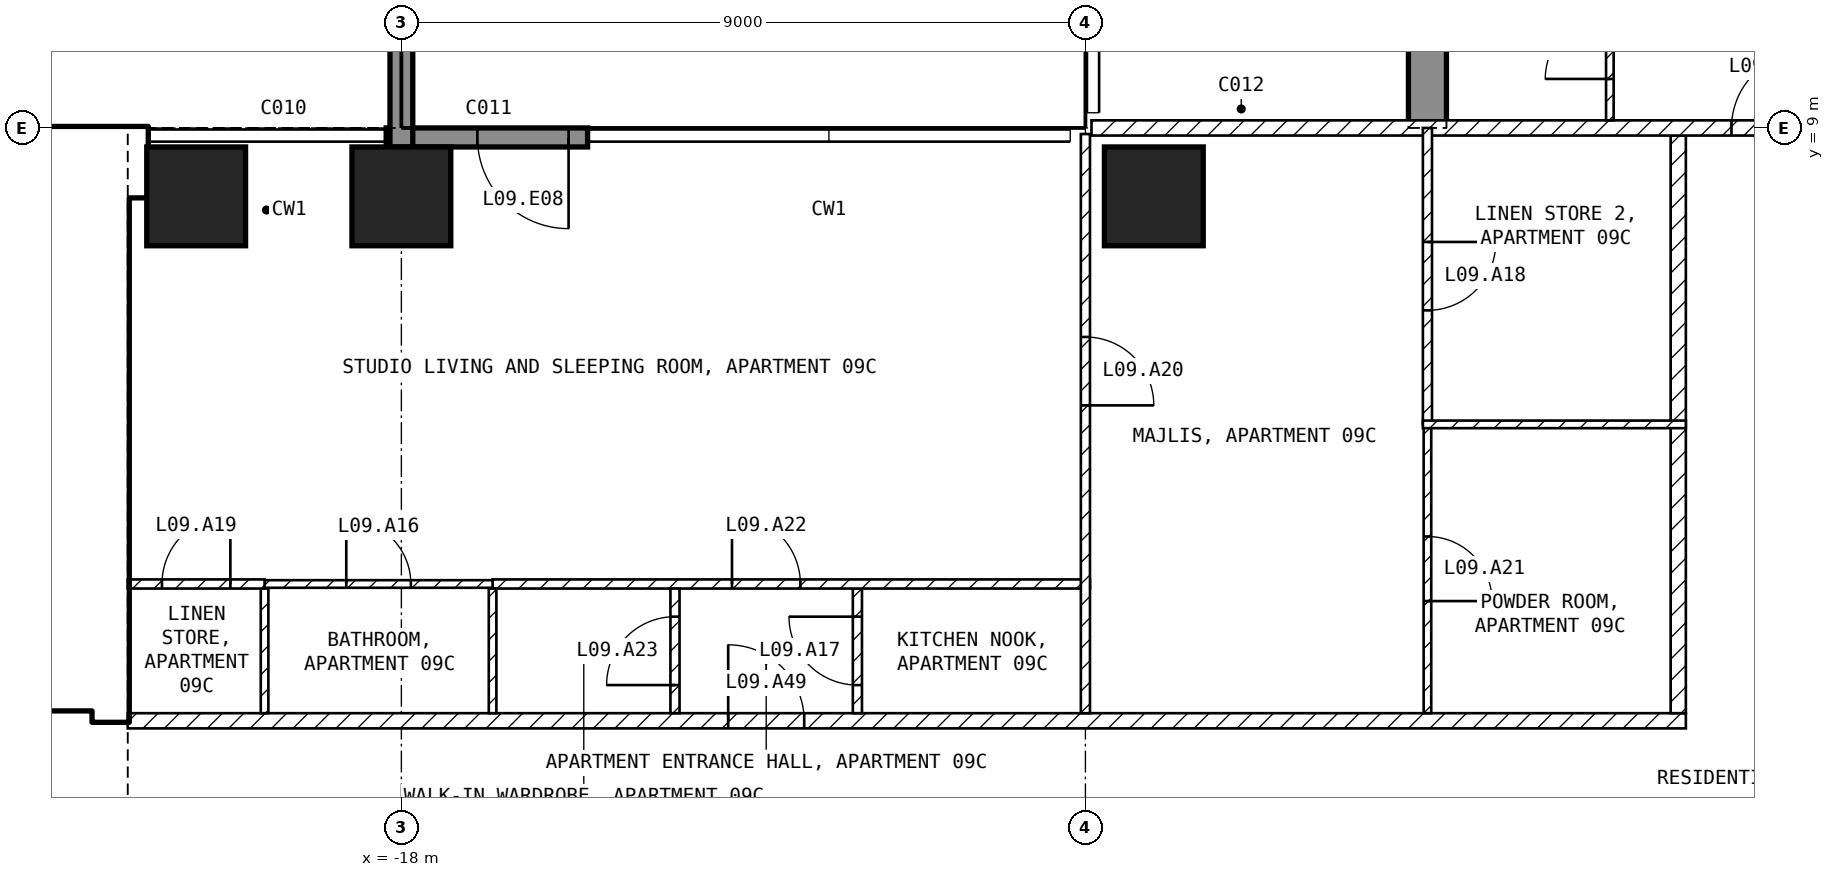
"""IFC4 building model, lengths in metres.
Left out: names, types, materials, properties, quantities, classifications, styles, units other than length and angle.
Written with IfcOpenShell. Run it as: python <this file> out.ifc"""

import sys

from ifc_helpers import new_model, si_unit, direction, frame, frame_2d, origin, origin_2d, place, context, subcontext, project, spatial, polyline, rectangle, outline, extrude, element, fill, save


model = new_model("IFC4")
c1 = context("Model", 3, precision=1e-05, world=origin(), true_north=direction((0.0, 1.0)))
c2 = subcontext(c1, "Body", "Model", "MODEL_VIEW")
j1 = project(units=[si_unit("LENGTHUNIT", "METRE"), si_unit("PLANEANGLEUNIT", "RADIAN")], contexts=[c1])
p1 = place(None, origin())
s1 = spatial("IfcSite", under=j1, at=p1, CompositionType="ELEMENT")
p2 = place(p1, origin())
s2 = spatial("IfcBuilding", under=s1, at=p2, CompositionType="ELEMENT")
p3 = place(p2, frame((0.0, 0.0, 50.5)))
s3 = spatial("IfcBuildingStorey", under=s2, at=p3, CompositionType="ELEMENT", Elevation=50.5)
for number, where, z_axis, x_axis in (
    (1, (-20.7, 8.1, -0.25), (0.0, 0.0, 1.0), (1.0, 0.0, 0.0)),
    (2, (-18.0, 8.1, -0.25), (0.0, 0.0, 1.0), (1.0, 0.0, 0.0)),
    (3, (-8.1, 8.1, -0.25), (0.0, 0.0, 1.0), (1.0, 0.0, 0.0)),
):
    element("IfcColumn", number, at=place(p3, frame(where, z_axis=z_axis, x_axis=x_axis)), inside=s3, PredefinedType="COLUMN", context=c2, shape_type="SweptSolid", body=[
        extrude(rectangle(XDim=1.3, YDim=1.3, at=origin_2d()), origin(), (0.0, 0.0, 1.0), 3.5),
    ])
p4 = place(p3, frame((-4.75, 9.0, -0.25), z_axis=(1.0, 0.0, 0.0), x_axis=(0.0, 1.0, 0.0)))
e4 = element("IfcWall", 4, at=p4, inside=s3, PredefinedType="SHEAR", context=c2, shape_type="SweptSolid", body=[
    extrude(outline(polyline([(0.0, 0.0), (2.1, 0.0), (2.1, 2.65), (4.5, 2.65), (4.5, 0.0), (9.9, 0.0), (9.9, 2.65), (12.3, 2.65), (12.3, 0.0), (16.45, 0.0), (16.45, 3.5), (0.0, 3.5), (0.0, 0.0)])), origin(), (0.0, 0.0, 1.0), 0.5),
])
p5 = place(p3, frame((-15.55, 8.875, 0.0), z_axis=(0.0, 0.0, 1.0), x_axis=(-1.0, 0.0, 0.0)))
e5 = element("IfcWall", 5, at=p5, inside=s3, PredefinedType="SOLIDWALL", context=c2, shape_type="SweptSolid", body=[
    extrude(rectangle(XDim=2.65, YDim=0.25, at=frame_2d((1.325, 0.0))), origin(), (0.0, 0.0, 1.0), 3.25),
])
p6 = place(p5, frame((0.25, 0.0, 0.0)))
e6 = element("IfcOpeningElement", 6, at=p6, cuts=e5, PredefinedType="OPENING", context=c2, shape_type="SweptSolid", body=[
    extrude(rectangle(XDim=1.2, YDim=2.4, at=frame_2d((0.6, 1.2))), frame((0.0, 0.135, 0.0), z_axis=(0.0, -1.0, 0.0), x_axis=(1.0, 0.0, 0.0)), (0.0, 0.0, 1.0), 0.27),
])
p7 = place(p3, frame((-18.0, 8.75, 0.0), z_axis=(0.0, 0.0, 1.0), x_axis=(0.0, 1.0, 0.0)))
e7 = element("IfcWall", 7, at=p7, inside=s3, PredefinedType="SOLIDWALL", context=c2, shape_type="SweptSolid", body=[
    extrude(rectangle(XDim=2.95, YDim=0.3, at=frame_2d((1.475, 0.0))), origin(), (0.0, 0.0, 1.0), 3.25),
])
p8 = place(p3, frame((-31.5, 8.55, 0.0), z_axis=(0.0, 0.0, 1.0), x_axis=(1.0, 0.0, 0.0)))
e8 = element("IfcWall", 8, at=p8, inside=s3, PredefinedType="SHEAR", context=c2, shape_type="SweptSolid", body=[
    extrude(rectangle(XDim=10.15, YDim=0.9, at=frame_2d((5.075, 0.0))), origin(), (0.0, 0.0, 1.0), 3.25),
])
p9 = place(p3, frame((-21.825, 1.2, 0.0), z_axis=(0.0, 0.0, 1.0), x_axis=(0.0, 1.0, 0.0)))
e9 = element("IfcWall", 9, at=p9, inside=s3, PredefinedType="SHEAR", context=c2, shape_type="SweptSolid", body=[
    extrude(rectangle(XDim=6.9, YDim=0.45, at=frame_2d((3.45, 0.0))), origin(), (0.0, 0.0, 1.0), 3.25),
])
p10 = place(p3, frame((-35.1, 1.45, 0.0), z_axis=(0.0, 0.0, 1.0), x_axis=(1.0, 0.0, 0.0)))
e10 = element("IfcWall", 10, at=p10, inside=s3, PredefinedType="SOLIDWALL", context=c2, shape_type="SweptSolid", body=[
    extrude(rectangle(XDim=13.05, YDim=0.2, at=frame_2d((6.525, 0.0))), origin(), (0.0, 0.0, 1.0), 3.25),
])
p11 = place(p10, frame((11.3, 0.0, 0.0)))
e11 = element("IfcOpeningElement", 11, at=p11, cuts=e10, PredefinedType="OPENING", context=c2, shape_type="SweptSolid", body=[
    extrude(rectangle(XDim=1.0, YDim=2.1, at=frame_2d((0.5, 1.05))), frame((0.0, 0.11, 0.0), z_axis=(0.0, -1.0, 0.0), x_axis=(1.0, 0.0, 0.0)), (0.0, 0.0, 1.0), 0.22),
])
p12 = place(p10, frame((8.8, 0.0, 0.0)))
e12 = element("IfcOpeningElement", 12, at=p12, cuts=e10, PredefinedType="OPENING", context=c2, shape_type="SweptSolid", body=[
    extrude(rectangle(XDim=1.0, YDim=2.1, at=frame_2d((0.5, 1.05))), frame((0.0, 0.11, 0.0), z_axis=(0.0, -1.0, 0.0), x_axis=(1.0, 0.0, 0.0)), (0.0, 0.0, 1.0), 0.22),
])
p13 = place(p3, frame((-28.35, 5.15, 0.0), z_axis=(0.0, 0.0, 1.0), x_axis=(1.0, 0.0, 0.0)))
e13 = element("IfcWall", 13, at=p13, inside=s3, PredefinedType="SOLIDWALL", context=c2, shape_type="SweptSolid", body=[
    extrude(rectangle(XDim=6.3, YDim=0.2, at=frame_2d((3.15, 0.0))), origin(), (0.0, 0.0, 1.0), 3.25),
])
p14 = place(p13, frame((5.1, 0.0, 0.0)))
e14 = element("IfcOpeningElement", 14, at=p14, cuts=e13, PredefinedType="OPENING", context=c2, shape_type="SweptSolid", body=[
    extrude(rectangle(XDim=1.0, YDim=2.1, at=frame_2d((0.5, 1.05))), frame((0.0, 0.11, 0.0), z_axis=(0.0, -1.0, 0.0), x_axis=(1.0, 0.0, 0.0)), (0.0, 0.0, 1.0), 0.22),
])
p15 = place(p3, frame((-21.6, 1.2, 0.0), z_axis=(0.0, 0.0, 1.0), x_axis=(1.0, 0.0, 0.0)))
e15 = element("IfcWall", 15, at=p15, inside=s3, PredefinedType="PARTITIONING", context=c2, shape_type="SweptSolid", body=[
    extrude(rectangle(XDim=20.5, YDim=0.2, at=frame_2d((10.25, 0.0))), origin(), (0.0, 0.0, 1.0), 3.25),
])
p16 = place(p15, frame((7.9, 0.0, 0.0)))
e16 = element("IfcOpeningElement", 16, at=p16, cuts=e15, PredefinedType="OPENING", context=c2, shape_type="SweptSolid", body=[
    extrude(rectangle(XDim=1.0, YDim=2.1, at=frame_2d((0.5, 1.05))), frame((0.0, 0.11, 0.0), z_axis=(0.0, -1.0, 0.0), x_axis=(1.0, 0.0, 0.0)), (0.0, 0.0, 1.0), 0.22),
])
p17 = place(p3, frame((-1.2, 1.3, 0.0), z_axis=(0.0, 0.0, 1.0), x_axis=(0.0, 1.0, 0.0)))
e17 = element("IfcWall", 17, at=p17, inside=s3, PredefinedType="PARTITIONING", context=c2, shape_type="SweptSolid", body=[
    extrude(rectangle(XDim=7.6, YDim=0.2, at=frame_2d((3.8, 0.0))), origin(), (0.0, 0.0, 1.0), 3.25),
])
p18 = place(p3, frame((-8.92, 9.0, 0.0), z_axis=(0.0, 0.0, 1.0), x_axis=(1.0, 0.0, 0.0)))
e18 = element("IfcWall", 18, at=p18, inside=s3, PredefinedType="PARTITIONING", context=c2, shape_type="SweptSolid", body=[
    extrude(rectangle(XDim=17.84, YDim=0.2, at=frame_2d((8.92, 0.0))), origin(), (0.0, 0.0, 1.0), 3.25),
])
p19 = place(p18, frame((8.42, 0.0, 0.0)))
e19 = element("IfcOpeningElement", 19, at=p19, cuts=e18, PredefinedType="OPENING", context=c2, shape_type="SweptSolid", body=[
    extrude(rectangle(XDim=1.0, YDim=2.1, at=frame_2d((0.5, 1.05))), frame((0.0, 0.11, 0.0), z_axis=(0.0, -1.0, 0.0), x_axis=(1.0, 0.0, 0.0)), (0.0, 0.0, 1.0), 0.22),
])
p20 = place(p3, frame((-12.0, 1.3, 0.0), z_axis=(0.0, 0.0, 1.0), x_axis=(0.0, 1.0, 0.0)))
e20 = element("IfcWall", 20, at=p20, inside=s3, PredefinedType="PARTITIONING", context=c2, shape_type="SweptSolid", body=[
    extrude(rectangle(XDim=1.64, YDim=0.12, at=frame_2d((0.82, 0.0))), origin(), (0.0, 0.0, 1.0), 3.25),
])
p21 = place(p20, frame((0.37, 0.0, 0.0)))
e21 = element("IfcOpeningElement", 21, at=p21, cuts=e20, PredefinedType="OPENING", context=c2, shape_type="SweptSolid", body=[
    extrude(rectangle(XDim=0.9, YDim=2.1, at=frame_2d((0.45, 1.05))), frame((0.0, 0.07, 0.0), z_axis=(0.0, -1.0, 0.0), x_axis=(1.0, 0.0, 0.0)), (0.0, 0.0, 1.0), 0.14),
])
p22 = place(p3, frame((-16.8, 3.0, 0.0), z_axis=(0.0, 0.0, 1.0), x_axis=(1.0, 0.0, 0.0)))
e22 = element("IfcWall", 22, at=p22, inside=s3, PredefinedType="PARTITIONING", context=c2, shape_type="SweptSolid", body=[
    extrude(rectangle(XDim=7.86, YDim=0.12, at=frame_2d((3.93, 0.0))), origin(), (0.0, 0.0, 1.0), 3.25),
])
p23 = place(p22, frame((3.15, 0.0, 0.0)))
e23 = element("IfcOpeningElement", 23, at=p23, cuts=e22, PredefinedType="OPENING", context=c2, shape_type="SweptSolid", body=[
    extrude(rectangle(XDim=0.9, YDim=2.1, at=frame_2d((0.45, 1.05))), frame((0.0, 0.07, 0.0), z_axis=(0.0, -1.0, 0.0), x_axis=(1.0, 0.0, 0.0)), (0.0, 0.0, 1.0), 0.14),
])
p24 = place(p3, frame((-9.0, 8.92, 0.0), z_axis=(0.0, 0.0, 1.0), x_axis=(0.0, -1.0, 0.0)))
e24 = element("IfcWall", 24, at=p24, inside=s3, PredefinedType="PARTITIONING", context=c2, shape_type="SweptSolid", body=[
    extrude(rectangle(XDim=7.62, YDim=0.12, at=frame_2d((3.81, 0.0))), origin(), (0.0, 0.0, 1.0), 3.25),
])
p25 = place(p24, frame((2.67, 0.0, 0.0)))
e25 = element("IfcOpeningElement", 25, at=p25, cuts=e24, PredefinedType="OPENING", context=c2, shape_type="SweptSolid", body=[
    extrude(rectangle(XDim=0.9, YDim=2.1, at=frame_2d((0.45, 1.05))), frame((0.0, 0.07, 0.0), z_axis=(0.0, -1.0, 0.0), x_axis=(1.0, 0.0, 0.0)), (0.0, 0.0, 1.0), 0.14),
])
p26 = place(p3, frame((-14.4, 1.3, 0.0), z_axis=(0.0, 0.0, 1.0), x_axis=(0.0, 1.0, 0.0)))
e26 = element("IfcWall", 26, at=p26, inside=s3, PredefinedType="PARTITIONING", context=c2, shape_type="SweptSolid", body=[
    extrude(rectangle(XDim=1.64, YDim=0.12, at=frame_2d((0.82, 0.0))), origin(), (0.0, 0.0, 1.0), 3.25),
])
p27 = place(p26, frame((0.37, 0.0, 0.0)))
e27 = element("IfcOpeningElement", 27, at=p27, cuts=e26, PredefinedType="OPENING", context=c2, shape_type="SweptSolid", body=[
    extrude(rectangle(XDim=0.9, YDim=2.1, at=frame_2d((0.45, 1.05))), frame((0.0, 0.07, 0.0), z_axis=(0.0, -1.0, 0.0), x_axis=(1.0, 0.0, 0.0)), (0.0, 0.0, 1.0), 0.14),
])
for number, where, z_axis, x_axis in (
    (28, (-16.8, 1.3, 0.0), (0.0, 0.0, 1.0), (0.0, 1.0, 0.0)),
    (29, (-19.8, 1.3, 0.0), (0.0, 0.0, 1.0), (0.0, 1.0, 0.0)),
):
    element("IfcWall", number, at=place(p3, frame(where, z_axis=z_axis, x_axis=x_axis)), inside=s3, PredefinedType="PARTITIONING", context=c2, shape_type="SweptSolid", body=[
        extrude(rectangle(XDim=1.64, YDim=0.1, at=frame_2d((0.82, 0.0))), origin(), (0.0, 0.0, 1.0), 3.25),
    ])
p28 = place(p3, frame((-19.8, 3.0, 0.0), z_axis=(0.0, 0.0, 1.0), x_axis=(1.0, 0.0, 0.0)))
e30 = element("IfcWall", 30, at=p28, inside=s3, PredefinedType="PARTITIONING", context=c2, shape_type="SweptSolid", body=[
    extrude(rectangle(XDim=3.0, YDim=0.1, at=frame_2d((1.5, 0.0))), origin(), (0.0, 0.0, 1.0), 3.25),
])
p29 = place(p28, frame((1.075, 0.0, 0.0)))
e31 = element("IfcOpeningElement", 31, at=p29, cuts=e30, PredefinedType="OPENING", context=c2, shape_type="SweptSolid", body=[
    extrude(rectangle(XDim=0.85, YDim=2.1, at=frame_2d((0.425, 1.05))), frame((0.0, 0.06, 0.0), z_axis=(0.0, -1.0, 0.0), x_axis=(1.0, 0.0, 0.0)), (0.0, 0.0, 1.0), 0.12),
])
p30 = place(p3, frame((-21.6, 3.0, 0.0), z_axis=(0.0, 0.0, 1.0), x_axis=(1.0, 0.0, 0.0)))
e32 = element("IfcWall", 32, at=p30, inside=s3, PredefinedType="PARTITIONING", context=c2, shape_type="SweptSolid", body=[
    extrude(rectangle(XDim=1.8, YDim=0.12, at=frame_2d((0.9, 0.0))), origin(), (0.0, 0.0, 1.0), 3.25),
])
p31 = place(p30, frame((0.45, 0.0, 0.0)))
e33 = element("IfcOpeningElement", 33, at=p31, cuts=e32, PredefinedType="OPENING", context=c2, shape_type="SweptSolid", body=[
    extrude(rectangle(XDim=0.9, YDim=2.1, at=frame_2d((0.45, 1.05))), frame((0.0, 0.07, 0.0), z_axis=(0.0, -1.0, 0.0), x_axis=(1.0, 0.0, 0.0)), (0.0, 0.0, 1.0), 0.14),
])
p32 = place(p3, frame((-4.5, 5.1, 0.0), z_axis=(0.0, 0.0, 1.0), x_axis=(0.0, -1.0, 0.0)))
e34 = element("IfcWall", 34, at=p32, inside=s3, PredefinedType="PARTITIONING", context=c2, shape_type="SweptSolid", body=[
    extrude(rectangle(XDim=3.8, YDim=0.1, at=frame_2d((1.9, 0.0))), origin(), (0.0, 0.0, 1.0), 3.25),
])
p33 = place(p32, frame((1.475, 0.0, 0.0)))
e35 = element("IfcOpeningElement", 35, at=p33, cuts=e34, PredefinedType="OPENING", context=c2, shape_type="SweptSolid", body=[
    extrude(rectangle(XDim=0.85, YDim=2.1, at=frame_2d((0.425, 1.05))), frame((0.0, 0.06, 0.0), z_axis=(0.0, -1.0, 0.0), x_axis=(1.0, 0.0, 0.0)), (0.0, 0.0, 1.0), 0.12),
])
p34 = place(p3, frame((-4.5, 9.0, 0.0), z_axis=(0.0, 0.0, 1.0), x_axis=(0.0, -1.0, 0.0)))
e36 = element("IfcWall", 36, at=p34, inside=s3, PredefinedType="PARTITIONING", context=c2, shape_type="SweptSolid", body=[
    extrude(rectangle(XDim=3.9, YDim=0.12, at=frame_2d((1.95, 0.0))), origin(), (0.0, 0.0, 1.0), 3.25),
])
p35 = place(p34, frame((1.5, 0.0, 0.0)))
e37 = element("IfcOpeningElement", 37, at=p35, cuts=e36, PredefinedType="OPENING", context=c2, shape_type="SweptSolid", body=[
    extrude(rectangle(XDim=0.9, YDim=2.1, at=frame_2d((0.45, 1.05))), frame((0.0, 0.07, 0.0), z_axis=(0.0, -1.0, 0.0), x_axis=(1.0, 0.0, 0.0)), (0.0, 0.0, 1.0), 0.14),
])
p36 = place(p3, frame((-4.56, 5.1, 0.0), z_axis=(0.0, 0.0, 1.0), x_axis=(1.0, 0.0, 0.0)))
e38 = element("IfcWall", 38, at=p36, inside=s3, PredefinedType="PARTITIONING", context=c2, shape_type="SweptSolid", body=[
    extrude(rectangle(XDim=3.46, YDim=0.1, at=frame_2d((1.73, 0.0))), origin(), (0.0, 0.0, 1.0), 3.25),
])
p37 = place(p3, frame((-2.1, 9.1, 0.0), z_axis=(0.0, 0.0, 1.0), x_axis=(0.0, 1.0, 0.0)))
e39 = element("IfcWall", 39, at=p37, inside=s3, PredefinedType="PARTITIONING", context=c2, shape_type="SweptSolid", body=[
    extrude(rectangle(XDim=1.94, YDim=0.1, at=frame_2d((0.97, 0.0))), origin(), (0.0, 0.0, 1.0), 3.25),
])
p38 = place(p37, frame((0.545, 0.0, 0.0)))
e40 = element("IfcOpeningElement", 40, at=p38, cuts=e39, PredefinedType="OPENING", context=c2, shape_type="SweptSolid", body=[
    extrude(rectangle(XDim=0.85, YDim=2.1, at=frame_2d((0.425, 1.05))), frame((0.0, 0.06, 0.0), z_axis=(0.0, -1.0, 0.0), x_axis=(1.0, 0.0, 0.0)), (0.0, 0.0, 1.0), 0.12),
])
p39 = place(p6, origin())
e41 = element("IfcDoor", 41, at=p39, inside=s3, OperationType="SINGLE_SWING_LEFT", PredefinedType="DOOR", context=c2, shape_type="SweptSolid", body=[
    extrude(rectangle(XDim=1.2, YDim=2.4, at=frame_2d((0.6, 1.2))), frame((0.0, 0.025, 0.0), z_axis=(0.0, -1.0, 0.0), x_axis=(1.0, 0.0, 0.0)), (0.0, 0.0, 1.0), 0.05),
])
fill(e6, e41)
p40 = place(p14, origin())
e42 = element("IfcDoor", 42, at=p40, inside=s3, OperationType="SINGLE_SWING_LEFT", PredefinedType="DOOR", context=c2, shape_type="SweptSolid", body=[
    extrude(rectangle(XDim=1.0, YDim=2.1, at=frame_2d((0.5, 1.05))), frame((0.0, 0.025, 0.0), z_axis=(0.0, -1.0, 0.0), x_axis=(1.0, 0.0, 0.0)), (0.0, 0.0, 1.0), 0.05),
])
fill(e14, e42)
p41 = place(p29, origin())
e43 = element("IfcDoor", 43, at=p41, inside=s3, OperationType="SINGLE_SWING_LEFT", PredefinedType="DOOR", context=c2, shape_type="SweptSolid", body=[
    extrude(rectangle(XDim=0.85, YDim=2.1, at=frame_2d((0.425, 1.05))), frame((0.0, 0.025, 0.0), z_axis=(0.0, -1.0, 0.0), x_axis=(1.0, 0.0, 0.0)), (0.0, 0.0, 1.0), 0.05),
])
fill(e31, e43)
p42 = place(p21, origin())
e44 = element("IfcDoor", 44, at=p42, inside=s3, OperationType="SINGLE_SWING_RIGHT", PredefinedType="DOOR", context=c2, shape_type="SweptSolid", body=[
    extrude(rectangle(XDim=0.9, YDim=2.1, at=frame_2d((0.45, 1.05))), frame((0.0, 0.025, 0.0), z_axis=(0.0, -1.0, 0.0), x_axis=(1.0, 0.0, 0.0)), (0.0, 0.0, 1.0), 0.05),
])
fill(e21, e44)
p43 = place(p35, origin())
e45 = element("IfcDoor", 45, at=p43, inside=s3, OperationType="SINGLE_SWING_LEFT", PredefinedType="DOOR", context=c2, shape_type="SweptSolid", body=[
    extrude(rectangle(XDim=0.9, YDim=2.1, at=frame_2d((0.45, 1.05))), frame((0.0, 0.025, 0.0), z_axis=(0.0, -1.0, 0.0), x_axis=(1.0, 0.0, 0.0)), (0.0, 0.0, 1.0), 0.05),
])
fill(e37, e45)
p44 = place(p31, origin())
e46 = element("IfcDoor", 46, at=p44, inside=s3, OperationType="SINGLE_SWING_RIGHT", PredefinedType="DOOR", context=c2, shape_type="SweptSolid", body=[
    extrude(rectangle(XDim=0.9, YDim=2.1, at=frame_2d((0.45, 1.05))), frame((0.0, 0.025, 0.0), z_axis=(0.0, -1.0, 0.0), x_axis=(1.0, 0.0, 0.0)), (0.0, 0.0, 1.0), 0.05),
])
fill(e33, e46)
p45 = place(p25, origin())
e47 = element("IfcDoor", 47, at=p45, inside=s3, OperationType="SINGLE_SWING_RIGHT", PredefinedType="DOOR", context=c2, shape_type="SweptSolid", body=[
    extrude(rectangle(XDim=0.9, YDim=2.1, at=frame_2d((0.45, 1.05))), frame((0.0, 0.025, 0.0), z_axis=(0.0, -1.0, 0.0), x_axis=(1.0, 0.0, 0.0)), (0.0, 0.0, 1.0), 0.05),
])
fill(e25, e47)
p46 = place(p33, origin())
e48 = element("IfcDoor", 48, at=p46, inside=s3, OperationType="SINGLE_SWING_RIGHT", PredefinedType="DOOR", context=c2, shape_type="SweptSolid", body=[
    extrude(rectangle(XDim=0.85, YDim=2.1, at=frame_2d((0.425, 1.05))), frame((0.0, 0.025, 0.0), z_axis=(0.0, -1.0, 0.0), x_axis=(1.0, 0.0, 0.0)), (0.0, 0.0, 1.0), 0.05),
])
fill(e35, e48)
p47 = place(p23, origin())
e49 = element("IfcDoor", 49, at=p47, inside=s3, OperationType="SINGLE_SWING_LEFT", PredefinedType="DOOR", context=c2, shape_type="SweptSolid", body=[
    extrude(rectangle(XDim=0.9, YDim=2.1, at=frame_2d((0.45, 1.05))), frame((0.0, 0.025, 0.0), z_axis=(0.0, -1.0, 0.0), x_axis=(1.0, 0.0, 0.0)), (0.0, 0.0, 1.0), 0.05),
])
fill(e23, e49)
p48 = place(p27, origin())
e50 = element("IfcDoor", 50, at=p48, inside=s3, OperationType="SINGLE_SWING_LEFT", PredefinedType="DOOR", context=c2, shape_type="SweptSolid", body=[
    extrude(rectangle(XDim=0.9, YDim=2.1, at=frame_2d((0.45, 1.05))), frame((0.0, 0.025, 0.0), z_axis=(0.0, -1.0, 0.0), x_axis=(1.0, 0.0, 0.0)), (0.0, 0.0, 1.0), 0.05),
])
fill(e27, e50)
p49 = place(p19, origin())
e51 = element("IfcDoor", 51, at=p49, inside=s3, OperationType="SINGLE_SWING_RIGHT", PredefinedType="DOOR", context=c2, shape_type="SweptSolid", body=[
    extrude(rectangle(XDim=1.0, YDim=2.1, at=frame_2d((0.5, 1.05))), frame((0.0, 0.025, 0.0), z_axis=(0.0, -1.0, 0.0), x_axis=(1.0, 0.0, 0.0)), (0.0, 0.0, 1.0), 0.05),
])
fill(e19, e51)
p50 = place(p38, origin())
e52 = element("IfcDoor", 52, at=p50, inside=s3, OperationType="SINGLE_SWING_LEFT", PredefinedType="DOOR", context=c2, shape_type="SweptSolid", body=[
    extrude(rectangle(XDim=0.85, YDim=2.1, at=frame_2d((0.425, 1.05))), frame((0.0, 0.025, 0.0), z_axis=(0.0, -1.0, 0.0), x_axis=(1.0, 0.0, 0.0)), (0.0, 0.0, 1.0), 0.05),
])
fill(e40, e52)
p51 = place(p16, origin())
e53 = element("IfcDoor", 53, at=p51, inside=s3, OperationType="SINGLE_SWING_LEFT", PredefinedType="DOOR", context=c2, shape_type="SweptSolid", body=[
    extrude(rectangle(XDim=1.0, YDim=2.1, at=frame_2d((0.5, 1.05))), frame((0.0, 0.025, 0.0), z_axis=(0.0, -1.0, 0.0), x_axis=(1.0, 0.0, 0.0)), (0.0, 0.0, 1.0), 0.05),
])
fill(e16, e53)
save(model, sys.argv[1])
